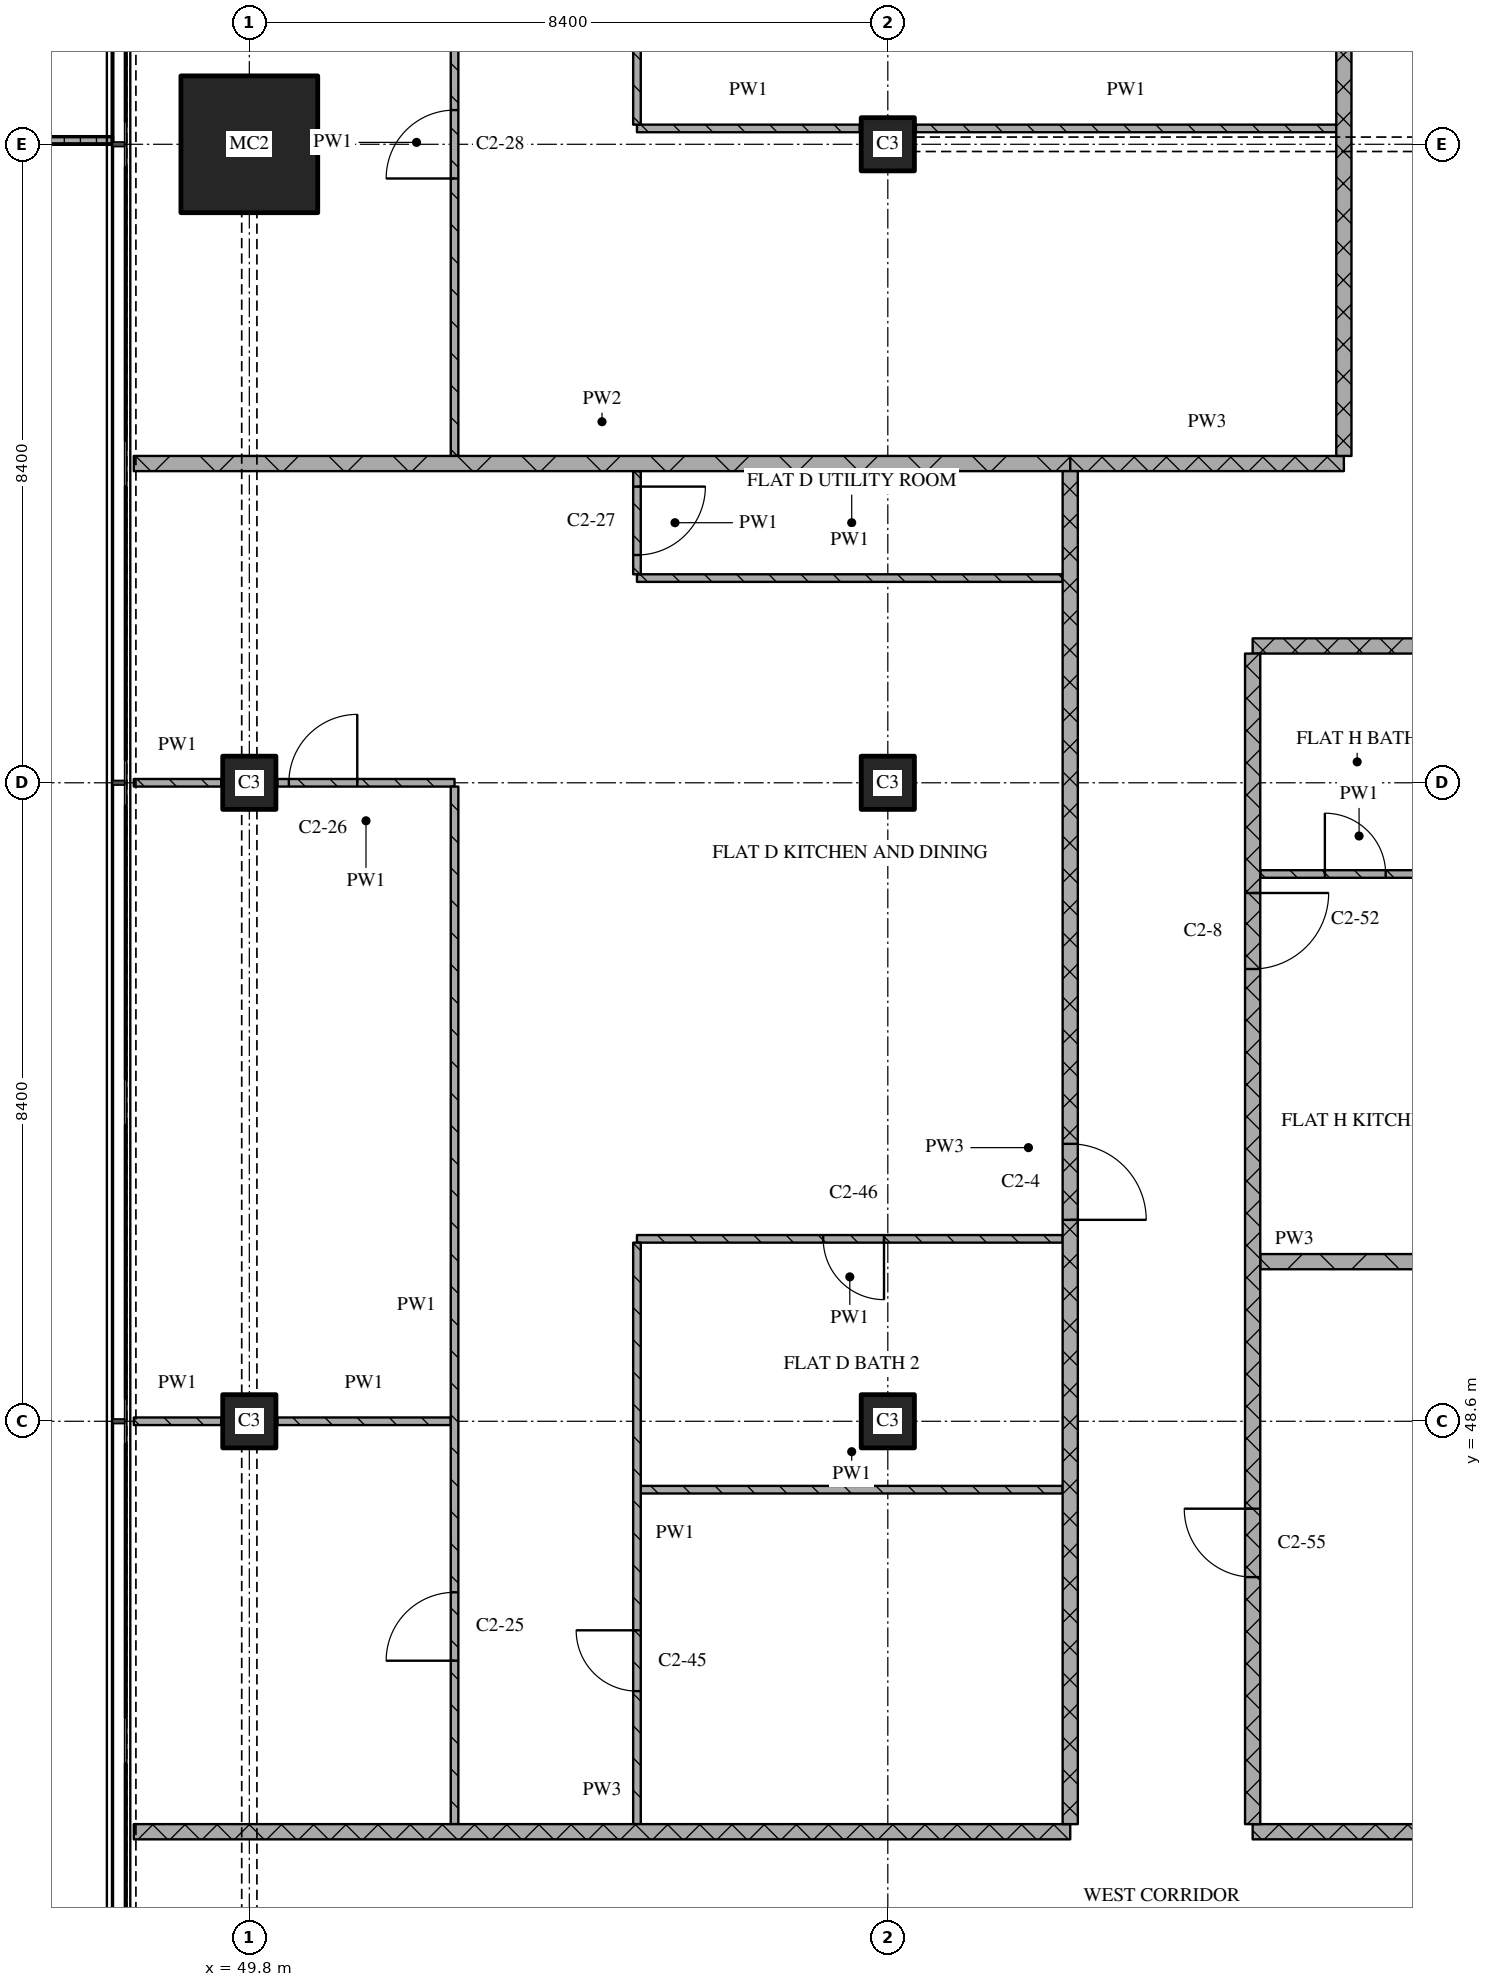
"""IFC4 building model, lengths in metres.
Left out: names, types, materials, properties, quantities, classifications, styles, units other than length and angle.
Written with IfcOpenShell. Run it as: python <this file> out.ifc"""

import sys

from ifc_helpers import new_model, si_unit, direction, frame, frame_2d, origin, origin_2d, place, context, subcontext, project, spatial, polyline, rectangle, outline, extrude, element, fill, save


model = new_model("IFC4")
c1 = context("Model", 3, precision=1e-05, world=origin(), true_north=direction((0.0, 1.0)))
c2 = subcontext(c1, "Body", "Model", "MODEL_VIEW")
j1 = project(units=[si_unit("LENGTHUNIT", "METRE"), si_unit("PLANEANGLEUNIT", "RADIAN")], contexts=[c1])
p1 = place(None, origin())
s1 = spatial("IfcSite", under=j1, at=p1, CompositionType="ELEMENT")
p2 = place(p1, origin())
s2 = spatial("IfcBuilding", under=s1, at=p2, CompositionType="ELEMENT")
p3 = place(p2, frame((0.0, 0.0, 165.45)))
s3 = spatial("IfcBuildingStorey", under=s2, at=p3, CompositionType="ELEMENT", Elevation=165.45)
for number, where, z_axis, x_axis in (
    (1, (49.8, 48.6, 0.0), (0.0, 0.0, 1.0), (1.0, 0.0, 0.0)),
    (2, (49.8, 57.0, 0.0), (0.0, 0.0, 1.0), (1.0, 0.0, 0.0)),
):
    element("IfcColumn", number, at=place(p3, frame(where, z_axis=z_axis, x_axis=x_axis)), inside=s3, PredefinedType="COLUMN", context=c2, shape_type="SweptSolid", body=[
        extrude(rectangle(XDim=0.7, YDim=0.7, at=origin_2d()), origin(), (0.0, 0.0, 1.0), 3.6),
    ])
p4 = place(p3, frame((49.8, 65.4, 0.0), z_axis=(0.0, 0.0, 1.0), x_axis=(1.0, 0.0, 0.0)))
e3 = element("IfcColumn", 3, at=p4, inside=s3, PredefinedType="COLUMN", context=c2, shape_type="SweptSolid", body=[
    extrude(rectangle(XDim=1.8, YDim=1.8, at=origin_2d()), origin(), (0.0, 0.0, 1.0), 3.6),
])
for number, where, z_axis, x_axis in (
    (4, (58.2, 48.6, 0.0), (0.0, 0.0, 1.0), (1.0, 0.0, 0.0)),
    (5, (58.2, 57.0, 0.0), (0.0, 0.0, 1.0), (1.0, 0.0, 0.0)),
    (6, (58.2, 65.4, 0.0), (0.0, 0.0, 1.0), (1.0, 0.0, 0.0)),
):
    element("IfcColumn", number, at=place(p3, frame(where, z_axis=z_axis, x_axis=x_axis)), inside=s3, PredefinedType="COLUMN", context=c2, shape_type="SweptSolid", body=[
        extrude(rectangle(XDim=0.7, YDim=0.7, at=origin_2d()), origin(), (0.0, 0.0, 1.0), 3.6),
    ])
p5 = place(p3, origin())
e7 = element("IfcWall", 7, at=p5, inside=s3, PredefinedType="SOLIDWALL", context=c2, shape_type="SweptSolid", body=[
    extrude(outline(polyline([(48.0, 69.6), (48.0, 69.5), (46.367, 69.5), (46.367, 65.5), (48.0, 65.5), (48.0, 65.4), (46.267, 65.4), (46.267, 69.6), (48.0, 69.6)])), origin(), (0.0, 0.0, 1.0), 1.0),
])
p6 = place(p3, frame((48.28, 43.2, 0.0), z_axis=(0.0, 0.0, 1.0), x_axis=(1.0, 0.0, 0.0)))
e8 = element("IfcWall", 8, at=p6, inside=s3, PredefinedType="PARTITIONING", context=c2, shape_type="SweptSolid", body=[
    extrude(rectangle(XDim=12.32, YDim=0.2, at=frame_2d((6.16, 0.0))), origin(), (0.0, 0.0, 1.0), 3.32),
])
p7 = place(p3, frame((63.0, 43.2, 0.0), z_axis=(0.0, 0.0, 1.0), x_axis=(1.0, 0.0, 0.0)))
e9 = element("IfcWall", 9, at=p7, inside=s3, PredefinedType="PARTITIONING", context=c2, shape_type="SweptSolid", body=[
    extrude(rectangle(XDim=5.2, YDim=0.2, at=frame_2d((2.6, 0.0))), origin(), (0.0, 0.0, 1.0), 3.32),
])
p8 = place(p3, frame((54.95, 47.7, 0.0), z_axis=(0.0, 0.0, 1.0), x_axis=(1.0, 0.0, 0.0)))
e10 = element("IfcWall", 10, at=p8, inside=s3, PredefinedType="PARTITIONING", context=c2, shape_type="SweptSolid", body=[
    extrude(rectangle(XDim=5.55, YDim=0.1, at=frame_2d((2.775, 0.0))), origin(), (0.0, 0.0, 1.0), 3.32),
])
p9 = place(p3, frame((48.28, 48.6, 0.0), z_axis=(0.0, 0.0, 1.0), x_axis=(1.0, 0.0, 0.0)))
e11 = element("IfcWall", 11, at=p9, inside=s3, PredefinedType="PARTITIONING", context=c2, shape_type="SweptSolid", body=[
    extrude(rectangle(XDim=1.15, YDim=0.1, at=frame_2d((0.575, 0.0))), origin(), (0.0, 0.0, 1.0), 3.32),
])
p10 = place(p3, frame((50.17, 48.6, 0.0), z_axis=(0.0, 0.0, 1.0), x_axis=(1.0, 0.0, 0.0)))
e12 = element("IfcWall", 12, at=p10, inside=s3, PredefinedType="PARTITIONING", context=c2, shape_type="SweptSolid", body=[
    extrude(rectangle(XDim=2.28, YDim=0.1, at=frame_2d((1.14, 0.0))), origin(), (0.0, 0.0, 1.0), 3.32),
])
p11 = place(p3, frame((63.1, 50.7, 0.0), z_axis=(0.0, 0.0, 1.0), x_axis=(1.0, 0.0, 0.0)))
e13 = element("IfcWall", 13, at=p11, inside=s3, PredefinedType="PARTITIONING", context=c2, shape_type="SweptSolid", body=[
    extrude(rectangle(XDim=5.1, YDim=0.2, at=frame_2d((2.55, 0.0))), origin(), (0.0, 0.0, 1.0), 3.32),
])
p12 = place(p3, frame((60.5, 51.0, 0.0), z_axis=(0.0, 0.0, 1.0), x_axis=(-1.0, 0.0, 0.0)))
e14 = element("IfcWall", 14, at=p12, inside=s3, PredefinedType="PARTITIONING", context=c2, shape_type="SweptSolid", body=[
    extrude(rectangle(XDim=5.6, YDim=0.1, at=frame_2d((2.8, 0.0))), origin(), (0.0, 0.0, 1.0), 3.32),
])
p13 = place(p12, frame((2.35, 0.0, 0.0)))
e15 = element("IfcOpeningElement", 15, at=p13, cuts=e14, PredefinedType="OPENING", context=c2, shape_type="SweptSolid", body=[
    extrude(rectangle(XDim=0.8, YDim=2.1, at=frame_2d((0.4, 1.05))), frame((0.0, 0.06, 0.0), z_axis=(0.0, -1.0, 0.0), x_axis=(1.0, 0.0, 0.0)), (0.0, 0.0, 1.0), 0.12),
])
p14 = place(p3, frame((63.1, 55.8, 0.0), z_axis=(0.0, 0.0, 1.0), x_axis=(1.0, 0.0, 0.0)))
e16 = element("IfcWall", 16, at=p14, inside=s3, PredefinedType="PARTITIONING", context=c2, shape_type="SweptSolid", body=[
    extrude(rectangle(XDim=2.6, YDim=0.1, at=frame_2d((1.3, 0.0))), origin(), (0.0, 0.0, 1.0), 3.32),
])
p15 = place(p14, frame((0.85, 0.0, 0.0)))
e17 = element("IfcOpeningElement", 17, at=p15, cuts=e16, PredefinedType="OPENING", context=c2, shape_type="SweptSolid", body=[
    extrude(rectangle(XDim=0.8, YDim=2.1, at=frame_2d((0.4, 1.05))), frame((0.0, 0.06, 0.0), z_axis=(0.0, -1.0, 0.0), x_axis=(1.0, 0.0, 0.0)), (0.0, 0.0, 1.0), 0.12),
])
p16 = place(p3, frame((48.28, 57.0, 0.0), z_axis=(0.0, 0.0, 1.0), x_axis=(1.0, 0.0, 0.0)))
e18 = element("IfcWall", 18, at=p16, inside=s3, PredefinedType="PARTITIONING", context=c2, shape_type="SweptSolid", body=[
    extrude(rectangle(XDim=1.15, YDim=0.1, at=frame_2d((0.575, 0.0))), origin(), (0.0, 0.0, 1.0), 3.32),
])
p17 = place(p3, frame((52.5, 57.0, 0.0), z_axis=(0.0, 0.0, 1.0), x_axis=(-1.0, 0.0, 0.0)))
e19 = element("IfcWall", 19, at=p17, inside=s3, PredefinedType="PARTITIONING", context=c2, shape_type="SweptSolid", body=[
    extrude(rectangle(XDim=2.33, YDim=0.1, at=frame_2d((1.165, 0.0))), origin(), (0.0, 0.0, 1.0), 3.32),
])
p18 = place(p17, frame((1.28, 0.0, 0.0)))
e20 = element("IfcOpeningElement", 20, at=p18, cuts=e19, PredefinedType="OPENING", context=c2, shape_type="SweptSolid", body=[
    extrude(rectangle(XDim=0.9, YDim=2.1, at=frame_2d((0.45, 1.05))), frame((0.0, 0.06, 0.0), z_axis=(0.0, -1.0, 0.0), x_axis=(1.0, 0.0, 0.0)), (0.0, 0.0, 1.0), 0.12),
])
p19 = place(p3, frame((63.0, 58.8, 0.0), z_axis=(0.0, 0.0, 1.0), x_axis=(1.0, 0.0, 0.0)))
e21 = element("IfcWall", 21, at=p19, inside=s3, PredefinedType="PARTITIONING", context=c2, shape_type="SweptSolid", body=[
    extrude(rectangle(XDim=10.8, YDim=0.2, at=frame_2d((5.4, 0.0))), origin(), (0.0, 0.0, 1.0), 3.32),
])
p20 = place(p3, frame((54.9, 59.693, 0.0), z_axis=(0.0, 0.0, 1.0), x_axis=(1.0, 0.0, 0.0)))
e22 = element("IfcWall", 22, at=p20, inside=s3, PredefinedType="PARTITIONING", context=c2, shape_type="SweptSolid", body=[
    extrude(rectangle(XDim=5.6, YDim=0.1, at=frame_2d((2.8, 0.0))), origin(), (0.0, 0.0, 1.0), 3.32),
])
p21 = place(p3, frame((60.6, 61.2, 0.0), z_axis=(0.0, 0.0, 1.0), x_axis=(1.0, 0.0, 0.0)))
e23 = element("IfcWall", 23, at=p21, inside=s3, PredefinedType="PARTITIONING", context=c2, shape_type="SweptSolid", body=[
    extrude(rectangle(XDim=3.6, YDim=0.2, at=frame_2d((1.8, 0.0))), origin(), (0.0, 0.0, 1.0), 3.32),
])
p22 = place(p3, frame((48.28, 61.2, 0.0), z_axis=(0.0, 0.0, 1.0), x_axis=(1.0, 0.0, 0.0)))
e24 = element("IfcWall", 24, at=p22, inside=s3, PredefinedType="PARTITIONING", context=c2, shape_type="SweptSolid", body=[
    extrude(rectangle(XDim=12.32, YDim=0.2, at=frame_2d((6.16, 0.0))), origin(), (0.0, 0.0, 1.0), 3.32),
])
p23 = place(p3, frame((54.9, 65.609, 0.0), z_axis=(0.0, 0.0, 1.0), x_axis=(1.0, 0.0, 0.0)))
e25 = element("IfcWall", 25, at=p23, inside=s3, PredefinedType="PARTITIONING", context=c2, shape_type="SweptSolid", body=[
    extrude(rectangle(XDim=2.93, YDim=0.1, at=frame_2d((1.465, 0.0))), origin(), (0.0, 0.0, 1.0), 3.32),
])
p24 = place(p3, frame((58.57, 65.609, 0.0), z_axis=(0.0, 0.0, 1.0), x_axis=(1.0, 0.0, 0.0)))
e26 = element("IfcWall", 26, at=p24, inside=s3, PredefinedType="PARTITIONING", context=c2, shape_type="SweptSolid", body=[
    extrude(rectangle(XDim=5.53, YDim=0.1, at=frame_2d((2.765, 0.0))), origin(), (0.0, 0.0, 1.0), 3.32),
])
p25 = place(p3, frame((52.5, 43.3, 0.0), z_axis=(0.0, 0.0, 1.0), x_axis=(0.0, 1.0, 0.0)))
e27 = element("IfcWall", 27, at=p25, inside=s3, PredefinedType="PARTITIONING", context=c2, shape_type="SweptSolid", body=[
    extrude(rectangle(XDim=13.65, YDim=0.1, at=frame_2d((6.825, 0.0))), origin(), (0.0, 0.0, 1.0), 3.32),
])
p26 = place(p25, frame((2.15, 0.0, 0.0)))
e28 = element("IfcOpeningElement", 28, at=p26, cuts=e27, PredefinedType="OPENING", context=c2, shape_type="SweptSolid", body=[
    extrude(rectangle(XDim=0.9, YDim=2.1, at=frame_2d((0.45, 1.05))), frame((0.0, 0.06, 0.0), z_axis=(0.0, -1.0, 0.0), x_axis=(1.0, 0.0, 0.0)), (0.0, 0.0, 1.0), 0.12),
])
p27 = place(p3, frame((52.5, 61.3, 0.0), z_axis=(0.0, 0.0, 1.0), x_axis=(0.0, 1.0, 0.0)))
e29 = element("IfcWall", 29, at=p27, inside=s3, PredefinedType="PARTITIONING", context=c2, shape_type="SweptSolid", body=[
    extrude(rectangle(XDim=8.25, YDim=0.1, at=frame_2d((4.125, 0.0))), origin(), (0.0, 0.0, 1.0), 3.32),
])
p28 = place(p27, frame((3.65, 0.0, 0.0)))
e30 = element("IfcOpeningElement", 30, at=p28, cuts=e29, PredefinedType="OPENING", context=c2, shape_type="SweptSolid", body=[
    extrude(rectangle(XDim=0.9, YDim=2.1, at=frame_2d((0.45, 1.05))), frame((0.0, 0.06, 0.0), z_axis=(0.0, -1.0, 0.0), x_axis=(1.0, 0.0, 0.0)), (0.0, 0.0, 1.0), 0.12),
])
p29 = place(p3, frame((54.9, 50.95, 0.0), z_axis=(0.0, 0.0, 1.0), x_axis=(0.0, -1.0, 0.0)))
e31 = element("IfcWall", 31, at=p29, inside=s3, PredefinedType="PARTITIONING", context=c2, shape_type="SweptSolid", body=[
    extrude(rectangle(XDim=7.65, YDim=0.1, at=frame_2d((3.825, 0.0))), origin(), (0.0, 0.0, 1.0), 3.32),
])
p30 = place(p29, frame((5.1, 0.0, 0.0)))
e32 = element("IfcOpeningElement", 32, at=p30, cuts=e31, PredefinedType="OPENING", context=c2, shape_type="SweptSolid", body=[
    extrude(rectangle(XDim=0.8, YDim=2.1, at=frame_2d((0.4, 1.05))), frame((0.0, 0.06, 0.0), z_axis=(0.0, -1.0, 0.0), x_axis=(1.0, 0.0, 0.0)), (0.0, 0.0, 1.0), 0.12),
])
p31 = place(p3, frame((54.9, 61.1, 0.0), z_axis=(0.0, 0.0, 1.0), x_axis=(0.0, -1.0, 0.0)))
e33 = element("IfcWall", 33, at=p31, inside=s3, PredefinedType="PARTITIONING", context=c2, shape_type="SweptSolid", body=[
    extrude(rectangle(XDim=1.357, YDim=0.1, at=frame_2d((0.679, 0.0))), origin(), (0.0, 0.0, 1.0), 3.32),
])
p32 = place(p31, frame((0.204, 0.0, 0.0)))
e34 = element("IfcOpeningElement", 34, at=p32, cuts=e33, PredefinedType="OPENING", context=c2, shape_type="SweptSolid", body=[
    extrude(rectangle(XDim=0.9, YDim=2.1, at=frame_2d((0.45, 1.05))), frame((0.0, 0.06, 0.0), z_axis=(0.0, -1.0, 0.0), x_axis=(1.0, 0.0, 0.0)), (0.0, 0.0, 1.0), 0.12),
])
p33 = place(p3, frame((54.9, 69.55, 0.0), z_axis=(0.0, 0.0, 1.0), x_axis=(0.0, -1.0, 0.0)))
e35 = element("IfcWall", 35, at=p33, inside=s3, PredefinedType="PARTITIONING", context=c2, shape_type="SweptSolid", body=[
    extrude(rectangle(XDim=3.891, YDim=0.1, at=frame_2d((1.946, 0.0))), origin(), (0.0, 0.0, 1.0), 3.32),
])
p34 = place(p3, frame((60.6, 43.3, 0.0), z_axis=(0.0, 0.0, 1.0), x_axis=(0.0, 1.0, 0.0)))
e36 = element("IfcWall", 36, at=p34, inside=s3, PredefinedType="PARTITIONING", context=c2, shape_type="SweptSolid", body=[
    extrude(rectangle(XDim=17.8, YDim=0.2, at=frame_2d((8.9, 0.0))), origin(), (0.0, 0.0, 1.0), 3.32),
])
p35 = place(p34, frame((7.95, 0.0, 0.0)))
e37 = element("IfcOpeningElement", 37, at=p35, cuts=e36, PredefinedType="OPENING", context=c2, shape_type="SweptSolid", body=[
    extrude(rectangle(XDim=1.0, YDim=2.1, at=frame_2d((0.5, 1.05))), frame((0.0, 0.11, 0.0), z_axis=(0.0, -1.0, 0.0), x_axis=(1.0, 0.0, 0.0)), (0.0, 0.0, 1.0), 0.22),
])
p36 = place(p3, frame((63.0, 58.7, 0.0), z_axis=(0.0, 0.0, 1.0), x_axis=(0.0, -1.0, 0.0)))
e38 = element("IfcWall", 38, at=p36, inside=s3, PredefinedType="PARTITIONING", context=c2, shape_type="SweptSolid", body=[
    extrude(rectangle(XDim=15.4, YDim=0.2, at=frame_2d((7.7, 0.0))), origin(), (0.0, 0.0, 1.0), 3.32),
])
p37 = place(p36, frame((3.15, 0.0, 0.0)))
e39 = element("IfcOpeningElement", 39, at=p37, cuts=e38, PredefinedType="OPENING", context=c2, shape_type="SweptSolid", body=[
    extrude(rectangle(XDim=1.0, YDim=2.1, at=frame_2d((0.5, 1.05))), frame((0.0, 0.11, 0.0), z_axis=(0.0, -1.0, 0.0), x_axis=(1.0, 0.0, 0.0)), (0.0, 0.0, 1.0), 0.22),
])
p38 = place(p36, frame((11.25, 0.0, 0.0)))
e40 = element("IfcOpeningElement", 40, at=p38, cuts=e38, PredefinedType="OPENING", context=c2, shape_type="SweptSolid", body=[
    extrude(rectangle(XDim=0.9, YDim=2.1, at=frame_2d((0.45, 1.05))), frame((0.0, 0.11, 0.0), z_axis=(0.0, -1.0, 0.0), x_axis=(1.0, 0.0, 0.0)), (0.0, 0.0, 1.0), 0.22),
])
p39 = place(p3, frame((64.2, 61.3, 0.0), z_axis=(0.0, 0.0, 1.0), x_axis=(0.0, 1.0, 0.0)))
e41 = element("IfcWall", 41, at=p39, inside=s3, PredefinedType="PARTITIONING", context=c2, shape_type="SweptSolid", body=[
    extrude(rectangle(XDim=14.02, YDim=0.2, at=frame_2d((7.01, 0.0))), origin(), (0.0, 0.0, 1.0), 3.32),
])
p40 = place(p39, frame((8.55, 0.0, 0.0)))
e42 = element("IfcOpeningElement", 42, at=p40, cuts=e41, PredefinedType="OPENING", context=c2, shape_type="SweptSolid", body=[
    extrude(rectangle(XDim=1.0, YDim=2.1, at=frame_2d((0.5, 1.05))), frame((0.0, 0.11, 0.0), z_axis=(0.0, -1.0, 0.0), x_axis=(1.0, 0.0, 0.0)), (0.0, 0.0, 1.0), 0.22),
])
p41 = place(p13, origin())
e43 = element("IfcDoor", 43, at=p41, inside=s3, OperationType="SINGLE_SWING_LEFT", PredefinedType="DOOR", context=c2, shape_type="SweptSolid", body=[
    extrude(rectangle(XDim=0.8, YDim=2.1, at=frame_2d((0.4, 1.05))), frame((0.0, 0.025, 0.0), z_axis=(0.0, -1.0, 0.0), x_axis=(1.0, 0.0, 0.0)), (0.0, 0.0, 1.0), 0.05),
])
fill(e15, e43)
p42 = place(p15, origin())
e44 = element("IfcDoor", 44, at=p42, inside=s3, OperationType="SINGLE_SWING_LEFT", PredefinedType="DOOR", context=c2, shape_type="SweptSolid", body=[
    extrude(rectangle(XDim=0.8, YDim=2.1, at=frame_2d((0.4, 1.05))), frame((0.0, 0.025, 0.0), z_axis=(0.0, -1.0, 0.0), x_axis=(1.0, 0.0, 0.0)), (0.0, 0.0, 1.0), 0.05),
])
fill(e17, e44)
p43 = place(p18, origin())
e45 = element("IfcDoor", 45, at=p43, inside=s3, OperationType="SINGLE_SWING_RIGHT", PredefinedType="DOOR", context=c2, shape_type="SweptSolid", body=[
    extrude(rectangle(XDim=0.9, YDim=2.1, at=frame_2d((0.45, 1.05))), frame((0.0, 0.025, 0.0), z_axis=(0.0, -1.0, 0.0), x_axis=(1.0, 0.0, 0.0)), (0.0, 0.0, 1.0), 0.05),
])
fill(e20, e45)
p44 = place(p26, origin())
e46 = element("IfcDoor", 46, at=p44, inside=s3, OperationType="SINGLE_SWING_LEFT", PredefinedType="DOOR", context=c2, shape_type="SweptSolid", body=[
    extrude(rectangle(XDim=0.9, YDim=2.1, at=frame_2d((0.45, 1.05))), frame((0.0, 0.025, 0.0), z_axis=(0.0, -1.0, 0.0), x_axis=(1.0, 0.0, 0.0)), (0.0, 0.0, 1.0), 0.05),
])
fill(e28, e46)
p45 = place(p28, origin())
e47 = element("IfcDoor", 47, at=p45, inside=s3, OperationType="SINGLE_SWING_LEFT", PredefinedType="DOOR", context=c2, shape_type="SweptSolid", body=[
    extrude(rectangle(XDim=0.9, YDim=2.1, at=frame_2d((0.45, 1.05))), frame((0.0, 0.025, 0.0), z_axis=(0.0, -1.0, 0.0), x_axis=(1.0, 0.0, 0.0)), (0.0, 0.0, 1.0), 0.05),
])
fill(e30, e47)
p46 = place(p30, origin())
e48 = element("IfcDoor", 48, at=p46, inside=s3, OperationType="SINGLE_SWING_RIGHT", PredefinedType="DOOR", context=c2, shape_type="SweptSolid", body=[
    extrude(rectangle(XDim=0.8, YDim=2.1, at=frame_2d((0.4, 1.05))), frame((0.0, 0.025, 0.0), z_axis=(0.0, -1.0, 0.0), x_axis=(1.0, 0.0, 0.0)), (0.0, 0.0, 1.0), 0.05),
])
fill(e32, e48)
p47 = place(p32, origin())
e49 = element("IfcDoor", 49, at=p47, inside=s3, OperationType="SINGLE_SWING_LEFT", PredefinedType="DOOR", context=c2, shape_type="SweptSolid", body=[
    extrude(rectangle(XDim=0.9, YDim=2.1, at=frame_2d((0.45, 1.05))), frame((0.0, 0.025, 0.0), z_axis=(0.0, -1.0, 0.0), x_axis=(1.0, 0.0, 0.0)), (0.0, 0.0, 1.0), 0.05),
])
fill(e34, e49)
p48 = place(p35, origin())
e50 = element("IfcDoor", 50, at=p48, inside=s3, OperationType="SINGLE_SWING_RIGHT", PredefinedType="DOOR", context=c2, shape_type="SweptSolid", body=[
    extrude(rectangle(XDim=1.0, YDim=2.1, at=frame_2d((0.5, 1.05))), frame((0.0, 0.025, 0.0), z_axis=(0.0, -1.0, 0.0), x_axis=(1.0, 0.0, 0.0)), (0.0, 0.0, 1.0), 0.05),
])
fill(e37, e50)
p49 = place(p37, origin())
e51 = element("IfcDoor", 51, at=p49, inside=s3, OperationType="SINGLE_SWING_LEFT", PredefinedType="DOOR", context=c2, shape_type="SweptSolid", body=[
    extrude(rectangle(XDim=1.0, YDim=2.1, at=frame_2d((0.5, 1.05))), frame((0.0, 0.025, 0.0), z_axis=(0.0, -1.0, 0.0), x_axis=(1.0, 0.0, 0.0)), (0.0, 0.0, 1.0), 0.05),
])
fill(e39, e51)
p50 = place(p38, origin())
e52 = element("IfcDoor", 52, at=p50, inside=s3, OperationType="SINGLE_SWING_RIGHT", PredefinedType="DOOR", context=c2, shape_type="SweptSolid", body=[
    extrude(rectangle(XDim=0.9, YDim=2.1, at=frame_2d((0.45, 1.05))), frame((0.0, 0.025, 0.0), z_axis=(0.0, -1.0, 0.0), x_axis=(1.0, 0.0, 0.0)), (0.0, 0.0, 1.0), 0.05),
])
fill(e40, e52)
save(model, sys.argv[1])
